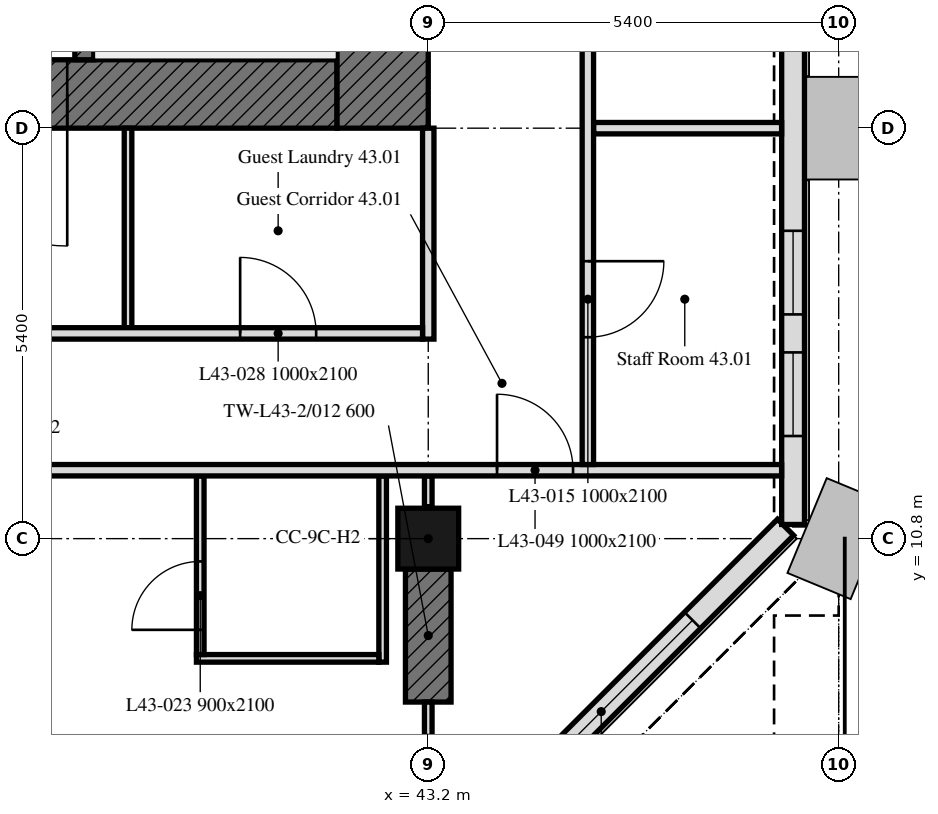
"""IFC4 building model, lengths in metres.
Left out: names, types, materials, properties, quantities, classifications, styles, units other than length and angle.
Written with IfcOpenShell. Run it as: python <this file> out.ifc"""

import sys

from ifc_helpers import new_model, si_unit, direction, frame, frame_2d, origin, origin_2d, place, context, subcontext, project, spatial, rectangle, extrude, element, fill, save


model = new_model("IFC4")
c1 = context("Model", 3, precision=1e-05, world=origin(), true_north=direction((0.0, 1.0)))
c2 = subcontext(c1, "Body", "Model", "MODEL_VIEW")
j1 = project(units=[si_unit("LENGTHUNIT", "METRE"), si_unit("PLANEANGLEUNIT", "RADIAN")], contexts=[c1])
p1 = place(None, origin())
s1 = spatial("IfcSite", under=j1, at=p1, CompositionType="ELEMENT")
p2 = place(p1, origin())
s2 = spatial("IfcBuilding", under=s1, at=p2, CompositionType="ELEMENT")
p3 = place(p2, frame((0.0, 0.0, 180.7)))
s3 = spatial("IfcBuildingStorey", under=s2, at=p3, CompositionType="ELEMENT", Elevation=180.7)
p4 = place(p3, frame((43.2, 10.8, 0.0), z_axis=(0.0, 0.0, 1.0), x_axis=(1.0, 0.0, 0.0)))
e1 = element("IfcColumn", 1, at=p4, inside=s3, PredefinedType="COLUMN", context=c2, shape_type="SweptSolid", body=[
    extrude(rectangle(XDim=0.8, YDim=0.8, at=origin_2d()), origin(), (0.0, 0.0, 1.0), 3.0),
])
p5 = place(p3, frame((43.2, 8.65, 0.0), z_axis=(0.0, 0.0, 1.0), x_axis=(0.0, 1.0, 0.0)))
e2 = element("IfcWall", 2, at=p5, inside=s3, PredefinedType="SHEAR", context=c2, shape_type="SweptSolid", body=[
    extrude(rectangle(XDim=1.75, YDim=0.6, at=frame_2d((0.875, 0.0))), origin(), (0.0, 0.0, 1.0), 3.0),
])
p6 = place(p3, frame((43.051, 6.099, 0.0), z_axis=(0.0, 0.0, 1.0), x_axis=(0.707106781187, 0.707106781187, 0.0)))
e3 = element("IfcWall", 3, at=p6, inside=s3, PredefinedType="SOLIDWALL", context=c2, shape_type="SweptSolid", body=[
    extrude(rectangle(XDim=6.86, YDim=0.3, at=frame_2d((3.43, 0.0))), origin(), (0.0, 0.0, 1.0), 3.0),
])
p7 = place(p6, frame((1.73, 0.0, 0.9)))
e4 = element("IfcOpeningElement", 4, at=p7, cuts=e3, PredefinedType="OPENING", context=c2, shape_type="SweptSolid", body=[
    extrude(rectangle(XDim=3.4, YDim=1.7, at=frame_2d((1.7, 0.85))), frame((0.0, 0.16, 0.0), z_axis=(0.0, -1.0, 0.0), x_axis=(1.0, 0.0, 0.0)), (0.0, 0.0, 1.0), 0.32),
])
p8 = place(p3, frame((48.0, 10.986, 0.0), z_axis=(0.0, 0.0, 1.0), x_axis=(0.0, 1.0, 0.0)))
e5 = element("IfcWall", 5, at=p8, inside=s3, PredefinedType="SOLIDWALL", context=c2, shape_type="SweptSolid", body=[
    extrude(rectangle(XDim=32.027, YDim=0.3, at=frame_2d((16.014, 0.0))), origin(), (0.0, 0.0, 1.0), 3.0),
])
p9 = place(p8, frame((1.164, 0.0, 0.9)))
e6 = element("IfcOpeningElement", 6, at=p9, cuts=e5, PredefinedType="OPENING", context=c2, shape_type="SweptSolid", body=[
    extrude(rectangle(XDim=1.1, YDim=1.7, at=frame_2d((0.55, 0.85))), frame((0.0, 0.16, 0.0), z_axis=(0.0, -1.0, 0.0), x_axis=(1.0, 0.0, 0.0)), (0.0, 0.0, 1.0), 0.32),
])
p10 = place(p8, frame((2.764, 0.0, 0.9)))
e7 = element("IfcOpeningElement", 7, at=p10, cuts=e5, PredefinedType="OPENING", context=c2, shape_type="SweptSolid", body=[
    extrude(rectangle(XDim=1.1, YDim=1.7, at=frame_2d((0.55, 0.85))), frame((0.0, 0.16, 0.0), z_axis=(0.0, -1.0, 0.0), x_axis=(1.0, 0.0, 0.0)), (0.0, 0.0, 1.0), 0.32),
])
p11 = place(p8, frame((7.664, 0.0, 0.9)))
e8 = element("IfcOpeningElement", 8, at=p11, cuts=e5, PredefinedType="OPENING", context=c2, shape_type="SweptSolid", body=[
    extrude(rectangle(XDim=0.5, YDim=1.7, at=frame_2d((0.25, 0.85))), frame((0.0, 0.16, 0.0), z_axis=(0.0, -1.0, 0.0), x_axis=(1.0, 0.0, 0.0)), (0.0, 0.0, 1.0), 0.32),
])
p12 = place(p8, frame((13.064, 0.0, 0.9)))
e9 = element("IfcOpeningElement", 9, at=p12, cuts=e5, PredefinedType="OPENING", context=c2, shape_type="SweptSolid", body=[
    extrude(rectangle(XDim=0.5, YDim=1.7, at=frame_2d((0.25, 0.85))), frame((0.0, 0.16, 0.0), z_axis=(0.0, -1.0, 0.0), x_axis=(1.0, 0.0, 0.0)), (0.0, 0.0, 1.0), 0.32),
])
p13 = place(p8, frame((18.464, 0.0, 0.9)))
e10 = element("IfcOpeningElement", 10, at=p13, cuts=e5, PredefinedType="OPENING", context=c2, shape_type="SweptSolid", body=[
    extrude(rectangle(XDim=0.5, YDim=1.7, at=frame_2d((0.25, 0.85))), frame((0.0, 0.16, 0.0), z_axis=(0.0, -1.0, 0.0), x_axis=(1.0, 0.0, 0.0)), (0.0, 0.0, 1.0), 0.32),
])
p14 = place(p8, frame((23.864, 0.0, 0.9)))
e11 = element("IfcOpeningElement", 11, at=p14, cuts=e5, PredefinedType="OPENING", context=c2, shape_type="SweptSolid", body=[
    extrude(rectangle(XDim=0.5, YDim=1.7, at=frame_2d((0.25, 0.85))), frame((0.0, 0.16, 0.0), z_axis=(0.0, -1.0, 0.0), x_axis=(1.0, 0.0, 0.0)), (0.0, 0.0, 1.0), 0.32),
])
p15 = place(p8, frame((28.164, 0.0, 0.9)))
e12 = element("IfcOpeningElement", 12, at=p15, cuts=e5, PredefinedType="OPENING", context=c2, shape_type="SweptSolid", body=[
    extrude(rectangle(XDim=1.1, YDim=1.7, at=frame_2d((0.55, 0.85))), frame((0.0, 0.16, 0.0), z_axis=(0.0, -1.0, 0.0), x_axis=(1.0, 0.0, 0.0)), (0.0, 0.0, 1.0), 0.32),
])
p16 = place(p8, frame((29.764, 0.0, 0.9)))
e13 = element("IfcOpeningElement", 13, at=p16, cuts=e5, PredefinedType="OPENING", context=c2, shape_type="SweptSolid", body=[
    extrude(rectangle(XDim=1.1, YDim=1.7, at=frame_2d((0.55, 0.85))), frame((0.0, 0.16, 0.0), z_axis=(0.0, -1.0, 0.0), x_axis=(1.0, 0.0, 0.0)), (0.0, 0.0, 1.0), 0.32),
])
p17 = place(p3, frame((42.0, 16.65, 0.0), z_axis=(0.0, 0.0, 1.0), x_axis=(-1.0, 0.0, 0.0)))
e14 = element("IfcWall", 14, at=p17, inside=s3, PredefinedType="SOLIDWALL", context=c2, shape_type="SweptSolid", body=[
    extrude(rectangle(XDim=11.1, YDim=0.9, at=frame_2d((5.55, 0.0))), origin(), (0.0, 0.0, 1.0), 3.0),
])
p18 = place(p17, frame((3.55, 0.0, 0.0)))
e15 = element("IfcOpeningElement", 15, at=p18, cuts=e14, PredefinedType="OPENING", context=c2, shape_type="SweptSolid", body=[
    extrude(rectangle(XDim=2.0, YDim=2.4, at=frame_2d((1.0, 1.2))), frame((0.0, 0.45, 0.0), z_axis=(0.0, -1.0, 0.0), x_axis=(1.0, 0.0, 0.0)), (0.0, 0.0, 1.0), 0.9),
])
p19 = place(p3, frame((42.6, 32.4, 0.0), z_axis=(0.0, 0.0, 1.0), x_axis=(0.0, -1.0, 0.0)))
e16 = element("IfcWall", 16, at=p19, inside=s3, PredefinedType="SOLIDWALL", context=c2, shape_type="SweptSolid", body=[
    extrude(rectangle(XDim=16.2, YDim=1.2, at=frame_2d((8.1, 0.0))), origin(), (0.0, 0.0, 1.0), 3.0),
])
p20 = place(p3, frame((38.675, 17.1, 0.0), z_axis=(0.0, 0.0, 1.0), x_axis=(0.0, 1.0, 0.0)))
e17 = element("IfcWall", 17, at=p20, inside=s3, PredefinedType="SOLIDWALL", context=c2, shape_type="SweptSolid", body=[
    extrude(rectangle(XDim=14.4, YDim=0.25, at=frame_2d((7.2, 0.0))), origin(), (0.0, 0.0, 1.0), 3.0),
])
p21 = place(p20, frame((4.6, 0.0, 0.0)))
e18 = element("IfcOpeningElement", 18, at=p21, cuts=e17, PredefinedType="OPENING", context=c2, shape_type="SweptSolid", body=[
    extrude(rectangle(XDim=1.0, YDim=2.1, at=frame_2d((0.5, 1.05))), frame((0.0, 0.125, 0.0), z_axis=(0.0, -1.0, 0.0), x_axis=(1.0, 0.0, 0.0)), (0.0, 0.0, 1.0), 0.25),
])
p22 = place(p20, frame((7.062, 0.0, 0.0)))
e19 = element("IfcOpeningElement", 19, at=p22, cuts=e17, PredefinedType="OPENING", context=c2, shape_type="SweptSolid", body=[
    extrude(rectangle(XDim=1.2, YDim=2.1, at=frame_2d((0.6, 1.05))), frame((0.0, 0.125, 0.0), z_axis=(0.0, -1.0, 0.0), x_axis=(1.0, 0.0, 0.0)), (0.0, 0.0, 1.0), 0.25),
])
p23 = place(p20, frame((9.472, 0.0, 0.0)))
e20 = element("IfcOpeningElement", 20, at=p23, cuts=e17, PredefinedType="OPENING", context=c2, shape_type="SweptSolid", body=[
    extrude(rectangle(XDim=0.9, YDim=2.1, at=frame_2d((0.45, 1.05))), frame((0.0, 0.125, 0.0), z_axis=(0.0, -1.0, 0.0), x_axis=(1.0, 0.0, 0.0)), (0.0, 0.0, 1.0), 0.25),
])
p24 = place(p20, frame((10.779, 0.0, 0.0)))
e21 = element("IfcOpeningElement", 21, at=p24, cuts=e17, PredefinedType="OPENING", context=c2, shape_type="SweptSolid", body=[
    extrude(rectangle(XDim=0.9, YDim=2.1, at=frame_2d((0.45, 1.05))), frame((0.0, 0.125, 0.0), z_axis=(0.0, -1.0, 0.0), x_axis=(1.0, 0.0, 0.0)), (0.0, 0.0, 1.0), 0.25),
])
p25 = place(p20, frame((12.048, 0.0, 0.0)))
e22 = element("IfcOpeningElement", 22, at=p25, cuts=e17, PredefinedType="OPENING", context=c2, shape_type="SweptSolid", body=[
    extrude(rectangle(XDim=0.9, YDim=2.1, at=frame_2d((0.45, 1.05))), frame((0.0, 0.125, 0.0), z_axis=(0.0, -1.0, 0.0), x_axis=(1.0, 0.0, 0.0)), (0.0, 0.0, 1.0), 0.25),
])
p26 = place(p20, frame((13.354, 0.0, 0.0)))
e23 = element("IfcOpeningElement", 23, at=p26, cuts=e17, PredefinedType="OPENING", context=c2, shape_type="SweptSolid", body=[
    extrude(rectangle(XDim=0.9, YDim=2.1, at=frame_2d((0.45, 1.05))), frame((0.0, 0.125, 0.0), z_axis=(0.0, -1.0, 0.0), x_axis=(1.0, 0.0, 0.0)), (0.0, 0.0, 1.0), 0.25),
])
p27 = place(p3, frame((47.849, 16.2, 0.0), z_axis=(0.0, 0.0, 1.0), x_axis=(-1.0, 0.0, 0.0)))
e24 = element("IfcWall", 24, at=p27, inside=s3, PredefinedType="PARTITIONING", context=c2, shape_type="SweptSolid", body=[
    extrude(rectangle(XDim=2.474, YDim=0.15, at=frame_2d((1.237, 0.0))), origin(), (0.0, 0.0, 1.0), 2.4),
])
p28 = place(p3, frame((43.2, 6.512, 0.0), z_axis=(0.0, 0.0, 1.0), x_axis=(0.0, 1.0, 0.0)))
e25 = element("IfcWall", 25, at=p28, inside=s3, PredefinedType="PARTITIONING", context=c2, shape_type="SweptSolid", body=[
    extrude(rectangle(XDim=2.138, YDim=0.1, at=frame_2d((1.069, 0.0))), origin(), (0.0, 0.0, 1.0), 3.0),
])
p29 = place(p28, frame((0.704, 0.0, 0.0)))
e26 = element("IfcOpeningElement", 26, at=p29, cuts=e25, PredefinedType="OPENING", context=c2, shape_type="SweptSolid", body=[
    extrude(rectangle(XDim=1.0, YDim=2.1, at=frame_2d((0.5, 1.05))), frame((0.0, 0.05, 0.0), z_axis=(0.0, -1.0, 0.0), x_axis=(1.0, 0.0, 0.0)), (0.0, 0.0, 1.0), 0.1),
])
p30 = place(p3, frame((43.2, 11.22, 0.0), z_axis=(0.0, 0.0, 1.0), x_axis=(0.0, 1.0, 0.0)))
e27 = element("IfcWall", 27, at=p30, inside=s3, PredefinedType="PARTITIONING", context=c2, shape_type="SweptSolid", body=[
    extrude(rectangle(XDim=0.405, YDim=0.1, at=frame_2d((0.203, 0.0))), origin(), (0.0, 0.0, 1.0), 3.0),
])
p31 = place(p3, frame((42.6, 11.625, 0.0), z_axis=(0.0, 0.0, 1.0), x_axis=(0.0, -1.0, 0.0)))
e28 = element("IfcWall", 28, at=p31, inside=s3, PredefinedType="PARTITIONING", context=c2, shape_type="SweptSolid", body=[
    extrude(rectangle(XDim=2.45, YDim=0.1, at=frame_2d((1.225, 0.0))), origin(), (0.0, 0.0, 1.0), 3.0),
])
p32 = place(p3, frame((42.55, 9.225, 0.0), z_axis=(0.0, 0.0, 1.0), x_axis=(-1.0, 0.0, 0.0)))
e29 = element("IfcWall", 29, at=p32, inside=s3, PredefinedType="PARTITIONING", context=c2, shape_type="SweptSolid", body=[
    extrude(rectangle(XDim=2.4, YDim=0.1, at=frame_2d((1.2, 0.0))), origin(), (0.0, 0.0, 1.0), 3.0),
])
p33 = place(p3, frame((40.2, 9.275, 0.0), z_axis=(0.0, 0.0, 1.0), x_axis=(0.0, 1.0, 0.0)))
e30 = element("IfcWall", 30, at=p33, inside=s3, PredefinedType="PARTITIONING", context=c2, shape_type="SweptSolid", body=[
    extrude(rectangle(XDim=2.35, YDim=0.1, at=frame_2d((1.175, 0.0))), origin(), (0.0, 0.0, 1.0), 3.0),
])
p34 = place(p33, frame((0.325, 0.0, 0.0)))
e31 = element("IfcOpeningElement", 31, at=p34, cuts=e30, PredefinedType="OPENING", context=c2, shape_type="SweptSolid", body=[
    extrude(rectangle(XDim=0.9, YDim=2.1, at=frame_2d((0.45, 1.05))), frame((0.0, 0.05, 0.0), z_axis=(0.0, -1.0, 0.0), x_axis=(1.0, 0.0, 0.0)), (0.0, 0.0, 1.0), 0.1),
])
p35 = place(p3, frame((6.151, 11.7, 0.0), z_axis=(0.0, 0.0, 1.0), x_axis=(1.0, 0.0, 0.0)))
e32 = element("IfcWall", 32, at=p35, inside=s3, PredefinedType="PARTITIONING", context=c2, shape_type="SweptSolid", body=[
    extrude(rectangle(XDim=41.698, YDim=0.15, at=frame_2d((20.849, 0.0))), origin(), (0.0, 0.0, 1.0), 3.0),
])
p36 = place(p35, frame((1.449, 0.0, 0.0)))
e33 = element("IfcOpeningElement", 33, at=p36, cuts=e32, PredefinedType="OPENING", context=c2, shape_type="SweptSolid", body=[
    extrude(rectangle(XDim=1.0, YDim=2.1, at=frame_2d((0.5, 1.05))), frame((0.0, 0.075, 0.0), z_axis=(0.0, -1.0, 0.0), x_axis=(1.0, 0.0, 0.0)), (0.0, 0.0, 1.0), 0.15),
])
p37 = place(p35, frame((37.954, 0.0, 0.0)))
e34 = element("IfcOpeningElement", 34, at=p37, cuts=e32, PredefinedType="OPENING", context=c2, shape_type="SweptSolid", body=[
    extrude(rectangle(XDim=1.0, YDim=2.1, at=frame_2d((0.5, 1.05))), frame((0.0, 0.075, 0.0), z_axis=(0.0, -1.0, 0.0), x_axis=(1.0, 0.0, 0.0)), (0.0, 0.0, 1.0), 0.15),
])
p38 = place(p35, frame((12.449, 0.0, 0.0)))
e35 = element("IfcOpeningElement", 35, at=p38, cuts=e32, PredefinedType="OPENING", context=c2, shape_type="SweptSolid", body=[
    extrude(rectangle(XDim=1.0, YDim=2.1, at=frame_2d((0.5, 1.05))), frame((0.0, 0.075, 0.0), z_axis=(0.0, -1.0, 0.0), x_axis=(1.0, 0.0, 0.0)), (0.0, 0.0, 1.0), 0.15),
])
p39 = place(p35, frame((23.249, 0.0, 0.0)))
e36 = element("IfcOpeningElement", 36, at=p39, cuts=e32, PredefinedType="OPENING", context=c2, shape_type="SweptSolid", body=[
    extrude(rectangle(XDim=1.0, YDim=2.1, at=frame_2d((0.5, 1.05))), frame((0.0, 0.075, 0.0), z_axis=(0.0, -1.0, 0.0), x_axis=(1.0, 0.0, 0.0)), (0.0, 0.0, 1.0), 0.15),
])
p40 = place(p3, frame((45.3, 26.925, 0.0), z_axis=(0.0, 0.0, 1.0), x_axis=(0.0, -1.0, 0.0)))
e37 = element("IfcWall", 37, at=p40, inside=s3, PredefinedType="PARTITIONING", context=c2, shape_type="SweptSolid", body=[
    extrude(rectangle(XDim=15.15, YDim=0.15, at=frame_2d((7.575, 0.0))), origin(), (0.0, 0.0, 1.0), 2.4),
])
p41 = place(p40, frame((12.475, 0.0, 0.0)))
e38 = element("IfcOpeningElement", 38, at=p41, cuts=e37, PredefinedType="OPENING", context=c2, shape_type="SweptSolid", body=[
    extrude(rectangle(XDim=1.0, YDim=2.1, at=frame_2d((0.5, 1.05))), frame((0.0, 0.075, 0.0), z_axis=(0.0, -1.0, 0.0), x_axis=(1.0, 0.0, 0.0)), (0.0, 0.0, 1.0), 0.15),
])
p42 = place(p40, frame((6.175, 0.0, 0.0)))
e39 = element("IfcOpeningElement", 39, at=p42, cuts=e37, PredefinedType="OPENING", context=c2, shape_type="SweptSolid", body=[
    extrude(rectangle(XDim=1.0, YDim=2.1, at=frame_2d((0.5, 1.05))), frame((0.0, 0.075, 0.0), z_axis=(0.0, -1.0, 0.0), x_axis=(1.0, 0.0, 0.0)), (0.0, 0.0, 1.0), 0.15),
])
p43 = place(p3, frame((39.25, 13.575, 0.0), z_axis=(0.0, 0.0, 1.0), x_axis=(0.0, 1.0, 0.0)))
e40 = element("IfcWall", 40, at=p43, inside=s3, PredefinedType="PARTITIONING", context=c2, shape_type="SweptSolid", body=[
    extrude(rectangle(XDim=2.625, YDim=0.1, at=frame_2d((1.312, 0.0))), origin(), (0.0, 0.0, 1.0), 3.0),
])
p44 = place(p3, frame((43.2, 16.2, 0.0), z_axis=(0.0, 0.0, 1.0), x_axis=(0.0, -1.0, 0.0)))
e41 = element("IfcWall", 41, at=p44, inside=s3, PredefinedType="PARTITIONING", context=c2, shape_type="SweptSolid", body=[
    extrude(rectangle(XDim=2.775, YDim=0.15, at=frame_2d((1.387, 0.0))), origin(), (0.0, 0.0, 1.0), 3.0),
])
p45 = place(p3, frame((6.151, 13.5, 0.0), z_axis=(0.0, 0.0, 1.0), x_axis=(1.0, 0.0, 0.0)))
e42 = element("IfcWall", 42, at=p45, inside=s3, PredefinedType="PARTITIONING", context=c2, shape_type="SweptSolid", body=[
    extrude(rectangle(XDim=36.974, YDim=0.15, at=frame_2d((18.487, 0.0))), origin(), (0.0, 0.0, 1.0), 3.0),
])
p46 = place(p45, frame((17.649, 0.0, 0.0)))
e43 = element("IfcOpeningElement", 43, at=p46, cuts=e42, PredefinedType="OPENING", context=c2, shape_type="SweptSolid", body=[
    extrude(rectangle(XDim=1.0, YDim=2.1, at=frame_2d((0.5, 1.05))), frame((0.0, 0.075, 0.0), z_axis=(0.0, -1.0, 0.0), x_axis=(1.0, 0.0, 0.0)), (0.0, 0.0, 1.0), 0.15),
])
p47 = place(p45, frame((2.029, 0.0, 0.0)))
e44 = element("IfcOpeningElement", 44, at=p47, cuts=e42, PredefinedType="OPENING", context=c2, shape_type="SweptSolid", body=[
    extrude(rectangle(XDim=1.0, YDim=2.1, at=frame_2d((0.5, 1.05))), frame((0.0, 0.075, 0.0), z_axis=(0.0, -1.0, 0.0), x_axis=(1.0, 0.0, 0.0)), (0.0, 0.0, 1.0), 0.15),
])
p48 = place(p45, frame((27.374, 0.0, 0.0)))
e45 = element("IfcOpeningElement", 45, at=p48, cuts=e42, PredefinedType="OPENING", context=c2, shape_type="SweptSolid", body=[
    extrude(rectangle(XDim=1.0, YDim=2.1, at=frame_2d((0.5, 1.05))), frame((0.0, 0.075, 0.0), z_axis=(0.0, -1.0, 0.0), x_axis=(1.0, 0.0, 0.0)), (0.0, 0.0, 1.0), 0.15),
])
p49 = place(p45, frame((34.574, 0.0, 0.0)))
e46 = element("IfcOpeningElement", 46, at=p49, cuts=e42, PredefinedType="OPENING", context=c2, shape_type="SweptSolid", body=[
    extrude(rectangle(XDim=1.0, YDim=2.1, at=frame_2d((0.5, 1.05))), frame((0.0, 0.075, 0.0), z_axis=(0.0, -1.0, 0.0), x_axis=(1.0, 0.0, 0.0)), (0.0, 0.0, 1.0), 0.15),
])
p50 = place(p45, frame((7.924, 0.0, 0.0)))
e47 = element("IfcOpeningElement", 47, at=p50, cuts=e42, PredefinedType="OPENING", context=c2, shape_type="SweptSolid", body=[
    extrude(rectangle(XDim=1.0, YDim=2.1, at=frame_2d((0.5, 1.05))), frame((0.0, 0.075, 0.0), z_axis=(0.0, -1.0, 0.0), x_axis=(1.0, 0.0, 0.0)), (0.0, 0.0, 1.0), 0.15),
])
p51 = place(p45, frame((4.699, 0.0, 0.0)))
e48 = element("IfcOpeningElement", 48, at=p51, cuts=e42, PredefinedType="OPENING", context=c2, shape_type="SweptSolid", body=[
    extrude(rectangle(XDim=1.8, YDim=2.4, at=frame_2d((0.9, 1.2))), frame((0.0, 0.075, 0.0), z_axis=(0.0, -1.0, 0.0), x_axis=(1.0, 0.0, 0.0)), (0.0, 0.0, 1.0), 0.15),
])
p52 = place(p45, frame((29.799, 0.0, 0.0)))
e49 = element("IfcOpeningElement", 49, at=p52, cuts=e42, PredefinedType="OPENING", context=c2, shape_type="SweptSolid", body=[
    extrude(rectangle(XDim=1.8, YDim=2.4, at=frame_2d((0.9, 1.2))), frame((0.0, 0.075, 0.0), z_axis=(0.0, -1.0, 0.0), x_axis=(1.0, 0.0, 0.0)), (0.0, 0.0, 1.0), 0.15),
])
p53 = place(p7, origin())
e50 = element("IfcWindow", 50, at=p53, inside=s3, PartitioningType="SINGLE_PANEL", PredefinedType="WINDOW", context=c2, shape_type="SweptSolid", body=[
    extrude(rectangle(XDim=3.4, YDim=1.7, at=frame_2d((1.7, 0.85))), frame((0.0, 0.03, 0.0), z_axis=(0.0, -1.0, 0.0), x_axis=(1.0, 0.0, 0.0)), (0.0, 0.0, 1.0), 0.06),
])
fill(e4, e50)
p54 = place(p9, origin())
e51 = element("IfcWindow", 51, at=p54, inside=s3, PartitioningType="SINGLE_PANEL", PredefinedType="WINDOW", context=c2, shape_type="SweptSolid", body=[
    extrude(rectangle(XDim=1.1, YDim=1.7, at=frame_2d((0.55, 0.85))), frame((0.0, 0.03, 0.0), z_axis=(0.0, -1.0, 0.0), x_axis=(1.0, 0.0, 0.0)), (0.0, 0.0, 1.0), 0.06),
])
fill(e6, e51)
p55 = place(p10, origin())
e52 = element("IfcWindow", 52, at=p55, inside=s3, PartitioningType="SINGLE_PANEL", PredefinedType="WINDOW", context=c2, shape_type="SweptSolid", body=[
    extrude(rectangle(XDim=1.1, YDim=1.7, at=frame_2d((0.55, 0.85))), frame((0.0, 0.03, 0.0), z_axis=(0.0, -1.0, 0.0), x_axis=(1.0, 0.0, 0.0)), (0.0, 0.0, 1.0), 0.06),
])
fill(e7, e52)
p56 = place(p18, origin())
e53 = element("IfcDoor", 53, at=p56, inside=s3, OperationType="DOUBLE_DOOR_SINGLE_SWING", PredefinedType="DOOR", context=c2, shape_type="SweptSolid", body=[
    extrude(rectangle(XDim=2.0, YDim=2.4, at=frame_2d((1.0, 1.2))), frame((0.0, 0.025, 0.0), z_axis=(0.0, -1.0, 0.0), x_axis=(1.0, 0.0, 0.0)), (0.0, 0.0, 1.0), 0.05),
])
fill(e15, e53)
p57 = place(p41, origin())
e54 = element("IfcDoor", 54, at=p57, inside=s3, OperationType="SINGLE_SWING_LEFT", PredefinedType="DOOR", context=c2, shape_type="SweptSolid", body=[
    extrude(rectangle(XDim=1.0, YDim=2.1, at=frame_2d((0.5, 1.05))), frame((0.0, 0.025, 0.0), z_axis=(0.0, -1.0, 0.0), x_axis=(1.0, 0.0, 0.0)), (0.0, 0.0, 1.0), 0.05),
])
fill(e38, e54)
p58 = place(p34, origin())
e55 = element("IfcDoor", 55, at=p58, inside=s3, OperationType="SINGLE_SWING_RIGHT", PredefinedType="DOOR", context=c2, shape_type="SweptSolid", body=[
    extrude(rectangle(XDim=0.9, YDim=2.1, at=frame_2d((0.45, 1.05))), frame((0.0, 0.025, 0.0), z_axis=(0.0, -1.0, 0.0), x_axis=(1.0, 0.0, 0.0)), (0.0, 0.0, 1.0), 0.05),
])
fill(e31, e55)
p59 = place(p49, origin())
e56 = element("IfcDoor", 56, at=p59, inside=s3, OperationType="SINGLE_SWING_RIGHT", PredefinedType="DOOR", context=c2, shape_type="SweptSolid", body=[
    extrude(rectangle(XDim=1.0, YDim=2.1, at=frame_2d((0.5, 1.05))), frame((0.0, 0.025, 0.0), z_axis=(0.0, -1.0, 0.0), x_axis=(1.0, 0.0, 0.0)), (0.0, 0.0, 1.0), 0.05),
])
fill(e46, e56)
p60 = place(p37, origin())
e57 = element("IfcDoor", 57, at=p60, inside=s3, OperationType="SINGLE_SWING_RIGHT", PredefinedType="DOOR", context=c2, shape_type="SweptSolid", body=[
    extrude(rectangle(XDim=1.0, YDim=2.1, at=frame_2d((0.5, 1.05))), frame((0.0, 0.025, 0.0), z_axis=(0.0, -1.0, 0.0), x_axis=(1.0, 0.0, 0.0)), (0.0, 0.0, 1.0), 0.05),
])
fill(e34, e57)
save(model, sys.argv[1])
